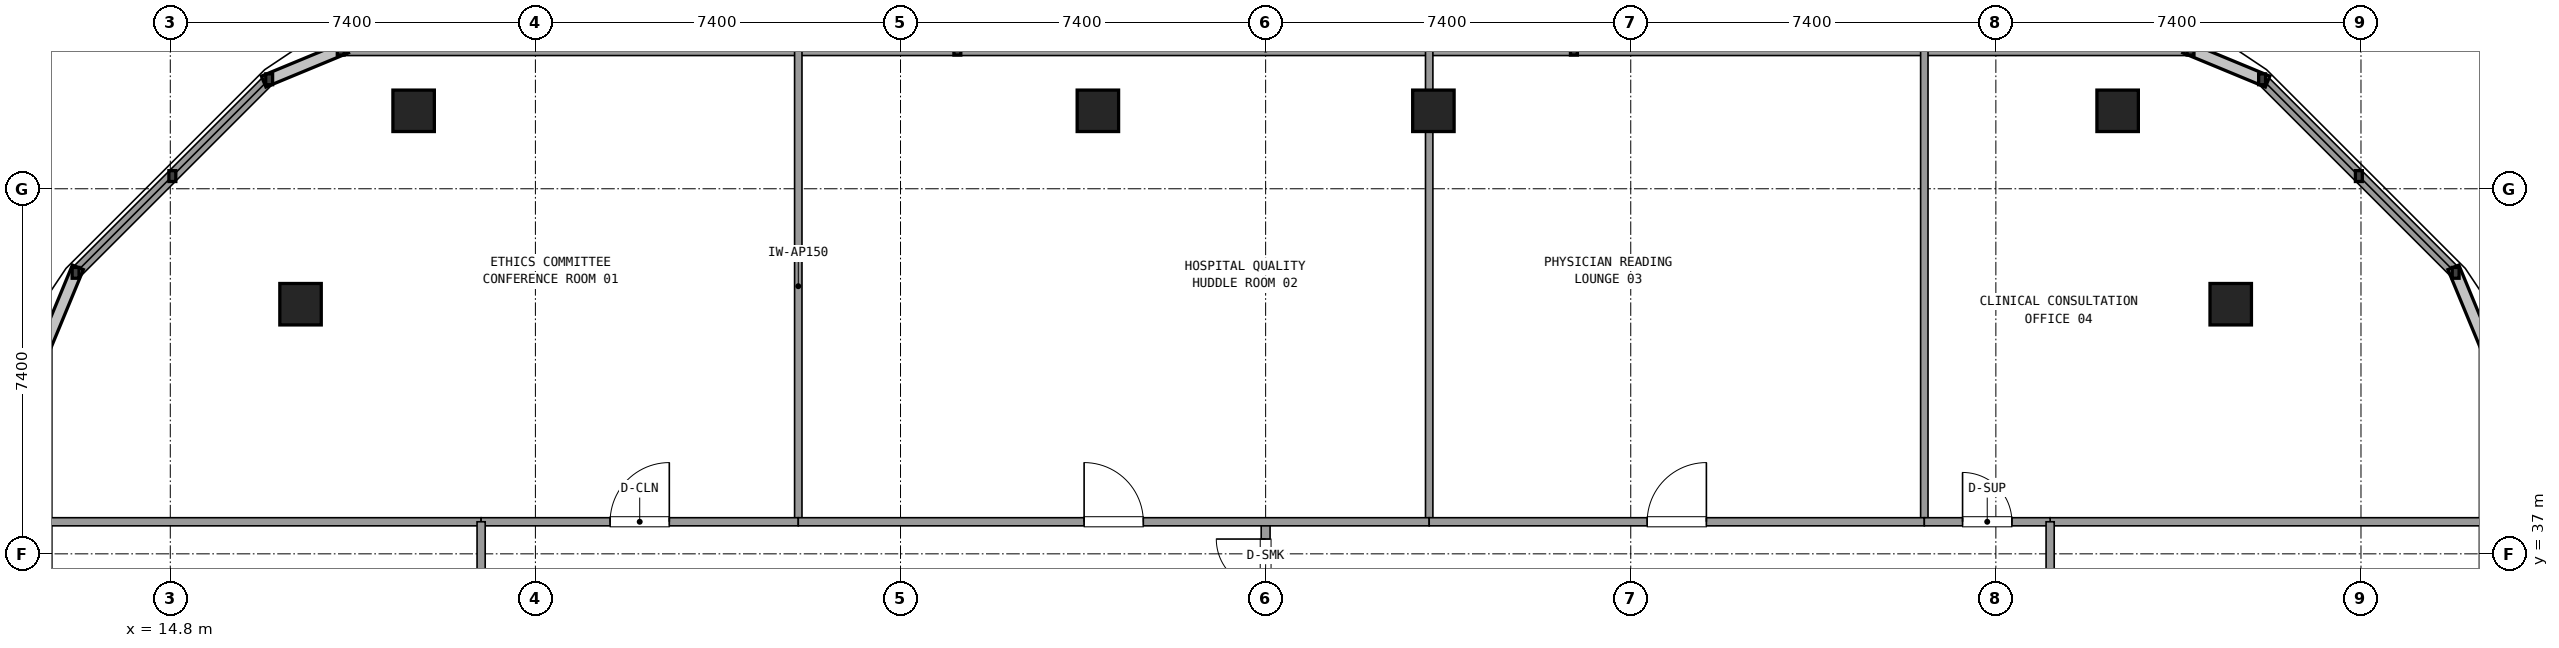
"""IFC4 building model, lengths in metres.
Left out: names, types, materials, properties, quantities, classifications, styles, units other than length and angle.
Written with IfcOpenShell. Run it as: python <this file> out.ifc"""

import sys

from ifc_helpers import new_model, si_unit, direction, frame, frame_2d, origin, origin_2d, place, context, subcontext, project, spatial, rectangle, extrude, element, fill, save


model = new_model("IFC4")
c1 = context("Model", 3, precision=1e-05, world=origin(), true_north=direction((0.0, 1.0)))
c2 = subcontext(c1, "Body", "Model", "MODEL_VIEW")
j1 = project(units=[si_unit("LENGTHUNIT", "METRE"), si_unit("PLANEANGLEUNIT", "RADIAN")], contexts=[c1])
p1 = place(None, origin())
s1 = spatial("IfcSite", under=j1, at=p1, CompositionType="ELEMENT")
p2 = place(p1, origin())
s2 = spatial("IfcBuilding", under=s1, at=p2, CompositionType="ELEMENT")
p3 = place(p2, frame((0.0, 0.0, 278.82)))
s3 = spatial("IfcBuildingStorey", under=s2, at=p3, CompositionType="ELEMENT", Elevation=278.82)
for number, where, z_axis, x_axis in (
    (1, (56.56, 42.06, 0.0), (0.0, 0.0, 1.0), (1.0, 0.0, 0.0)),
    (2, (54.268, 45.98, 0.0), (0.0, 0.0, 1.0), (1.0, 0.0, 0.0)),
    (3, (40.4, 45.98, 0.0), (0.0, 0.0, 1.0), (1.0, 0.0, 0.0)),
    (4, (33.6, 45.98, 0.0), (0.0, 0.0, 1.0), (1.0, 0.0, 0.0)),
    (5, (19.732, 45.98, 0.0), (0.0, 0.0, 1.0), (1.0, 0.0, 0.0)),
    (6, (17.44, 42.06, 0.0), (0.0, 0.0, 1.0), (1.0, 0.0, 0.0)),
):
    element("IfcColumn", number, at=place(p3, frame(where, z_axis=z_axis, x_axis=x_axis)), inside=s3, PredefinedType="COLUMN", context=c2, shape_type="SweptSolid", body=[
        extrude(rectangle(XDim=0.84, YDim=0.84, at=origin_2d()), origin(), (0.0, 0.0, 1.0), 3.6),
    ])
p4 = place(p3, frame((61.72, 10.555, 0.0), z_axis=(0.0, 0.0, 1.0), x_axis=(0.0, 1.0, 0.0)))
e7 = element("IfcWall", 7, at=p4, inside=s3, PredefinedType="SOLIDWALL", context=c2, shape_type="SweptSolid", body=[
    extrude(rectangle(XDim=30.69, YDim=0.24, at=frame_2d((15.345, 0.0))), origin(), (0.0, 0.0, 1.0), 0.85),
])
p5 = place(p3, frame((61.119, 42.696, 0.0), z_axis=(0.0, 0.0, 1.0), x_axis=(-0.707106781187, 0.707106781187, 0.0)))
e8 = element("IfcWall", 8, at=p5, inside=s3, PredefinedType="SOLIDWALL", context=c2, shape_type="SweptSolid", body=[
    extrude(rectangle(XDim=5.548, YDim=0.24, at=frame_2d((2.774, 0.0))), origin(), (0.0, 0.0, 1.0), 0.85),
])
p6 = place(p3, frame((55.745, 47.22, 0.0), z_axis=(0.0, 0.0, 1.0), x_axis=(-1.0, 0.0, 0.0)))
e9 = element("IfcWall", 9, at=p6, inside=s3, PredefinedType="SOLIDWALL", context=c2, shape_type="SweptSolid", body=[
    extrude(rectangle(XDim=37.49, YDim=0.24, at=frame_2d((18.745, 0.0))), origin(), (0.0, 0.0, 1.0), 0.85),
])
p7 = place(p3, frame((16.804, 46.619, 0.0), z_axis=(0.0, 0.0, 1.0), x_axis=(-0.707106781187, -0.707106781187, 0.0)))
e10 = element("IfcWall", 10, at=p7, inside=s3, PredefinedType="SOLIDWALL", context=c2, shape_type="SweptSolid", body=[
    extrude(rectangle(XDim=5.548, YDim=0.24, at=frame_2d((2.774, 0.0))), origin(), (0.0, 0.0, 1.0), 0.85),
])
p8 = place(p3, frame((12.28, 41.245, 0.0), z_axis=(0.0, 0.0, 1.0), x_axis=(0.0, -1.0, 0.0)))
e11 = element("IfcWall", 11, at=p8, inside=s3, PredefinedType="SOLIDWALL", context=c2, shape_type="SweptSolid", body=[
    extrude(rectangle(XDim=13.805, YDim=0.24, at=frame_2d((6.903, 0.0))), origin(), (0.0, 0.0, 1.0), 0.85),
])
p9 = place(p3, frame((37.0, 34.95, 0.0), z_axis=(0.0, 0.0, 1.0), x_axis=(0.0, 1.0, 0.0)))
e12 = element("IfcWall", 12, at=p9, inside=s3, PredefinedType="PARTITIONING", context=c2, shape_type="SweptSolid", body=[
    extrude(rectangle(XDim=2.7, YDim=0.18, at=frame_2d((1.35, 0.0))), origin(), (0.0, 0.0, 1.0), 2.61),
])
p10 = place(p9, frame((0.35, 0.0, 0.0)))
e13 = element("IfcOpeningElement", 13, at=p10, cuts=e12, PredefinedType="OPENING", context=c2, shape_type="SweptSolid", body=[
    extrude(rectangle(XDim=2.0, YDim=2.2, at=frame_2d((1.0, 1.1))), frame((0.0, 0.1, 0.0), z_axis=(0.0, -1.0, 0.0), x_axis=(1.0, 0.0, 0.0)), (0.0, 0.0, 1.0), 0.2),
])
for number, where, z_axis, x_axis in (
    (14, (12.3, 37.65, 0.0), (0.0, 0.0, 1.0), (1.0, 0.0, 0.0)),
    (15, (52.9, 37.65, 0.0), (0.0, 0.0, 1.0), (1.0, 0.0, 0.0)),
):
    element("IfcWall", number, at=place(p3, frame(where, z_axis=z_axis, x_axis=x_axis)), inside=s3, PredefinedType="PARTITIONING", context=c2, shape_type="SweptSolid", body=[
        extrude(rectangle(XDim=8.8, YDim=0.165, at=frame_2d((4.4, 0.0))), origin(), (0.0, 0.0, 1.0), 2.61),
    ])
p11 = place(p3, frame((27.528, 37.65, 0.0), z_axis=(0.0, 0.0, 1.0), x_axis=(0.0, 1.0, 0.0)))
e16 = element("IfcWall", 16, at=p11, inside=s3, PredefinedType="PARTITIONING", context=c2, shape_type="SweptSolid", body=[
    extrude(rectangle(XDim=9.55, YDim=0.15, at=frame_2d((4.775, 0.0))), origin(), (0.0, 0.0, 1.0), 2.61),
])
p12 = place(p3, frame((21.1, 37.65, 0.0), z_axis=(0.0, 0.0, 1.0), x_axis=(1.0, 0.0, 0.0)))
e17 = element("IfcWall", 17, at=p12, inside=s3, PredefinedType="PARTITIONING", context=c2, shape_type="SweptSolid", body=[
    extrude(rectangle(XDim=6.428, YDim=0.165, at=frame_2d((3.214, 0.0))), origin(), (0.0, 0.0, 1.0), 2.61),
])
p13 = place(p12, frame((2.614, 0.0, 0.0)))
e18 = element("IfcOpeningElement", 18, at=p13, cuts=e17, PredefinedType="OPENING", context=c2, shape_type="SweptSolid", body=[
    extrude(rectangle(XDim=1.2, YDim=2.15, at=frame_2d((0.6, 1.075))), frame((0.0, 0.093, 0.0), z_axis=(0.0, -1.0, 0.0), x_axis=(1.0, 0.0, 0.0)), (0.0, 0.0, 1.0), 0.185),
])
p14 = place(p3, frame((40.315, 37.65, 0.0), z_axis=(0.0, 0.0, 1.0), x_axis=(0.0, 1.0, 0.0)))
e19 = element("IfcWall", 19, at=p14, inside=s3, PredefinedType="PARTITIONING", context=c2, shape_type="SweptSolid", body=[
    extrude(rectangle(XDim=9.55, YDim=0.15, at=frame_2d((4.775, 0.0))), origin(), (0.0, 0.0, 1.0), 2.61),
])
p15 = place(p3, frame((27.528, 37.65, 0.0), z_axis=(0.0, 0.0, 1.0), x_axis=(1.0, 0.0, 0.0)))
e20 = element("IfcWall", 20, at=p15, inside=s3, PredefinedType="PARTITIONING", context=c2, shape_type="SweptSolid", body=[
    extrude(rectangle(XDim=12.787, YDim=0.165, at=frame_2d((6.394, 0.0))), origin(), (0.0, 0.0, 1.0), 2.61),
])
p16 = place(p15, frame((5.793, 0.0, 0.0)))
e21 = element("IfcOpeningElement", 21, at=p16, cuts=e20, PredefinedType="OPENING", context=c2, shape_type="SweptSolid", body=[
    extrude(rectangle(XDim=1.2, YDim=2.15, at=frame_2d((0.6, 1.075))), frame((0.0, 0.093, 0.0), z_axis=(0.0, -1.0, 0.0), x_axis=(1.0, 0.0, 0.0)), (0.0, 0.0, 1.0), 0.185),
])
p17 = place(p3, frame((50.35, 37.65, 0.0), z_axis=(0.0, 0.0, 1.0), x_axis=(0.0, 1.0, 0.0)))
e22 = element("IfcWall", 22, at=p17, inside=s3, PredefinedType="PARTITIONING", context=c2, shape_type="SweptSolid", body=[
    extrude(rectangle(XDim=9.55, YDim=0.15, at=frame_2d((4.775, 0.0))), origin(), (0.0, 0.0, 1.0), 2.61),
])
p18 = place(p3, frame((40.315, 37.65, 0.0), z_axis=(0.0, 0.0, 1.0), x_axis=(1.0, 0.0, 0.0)))
e23 = element("IfcWall", 23, at=p18, inside=s3, PredefinedType="PARTITIONING", context=c2, shape_type="SweptSolid", body=[
    extrude(rectangle(XDim=10.035, YDim=0.165, at=frame_2d((5.018, 0.0))), origin(), (0.0, 0.0, 1.0), 2.61),
])
p19 = place(p18, frame((4.418, 0.0, 0.0)))
e24 = element("IfcOpeningElement", 24, at=p19, cuts=e23, PredefinedType="OPENING", context=c2, shape_type="SweptSolid", body=[
    extrude(rectangle(XDim=1.2, YDim=2.15, at=frame_2d((0.6, 1.075))), frame((0.0, 0.093, 0.0), z_axis=(0.0, -1.0, 0.0), x_axis=(1.0, 0.0, 0.0)), (0.0, 0.0, 1.0), 0.185),
])
p20 = place(p3, frame((50.35, 37.65, 0.0), z_axis=(0.0, 0.0, 1.0), x_axis=(1.0, 0.0, 0.0)))
e25 = element("IfcWall", 25, at=p20, inside=s3, PredefinedType="PARTITIONING", context=c2, shape_type="SweptSolid", body=[
    extrude(rectangle(XDim=2.55, YDim=0.165, at=frame_2d((1.275, 0.0))), origin(), (0.0, 0.0, 1.0), 2.61),
])
p21 = place(p20, frame((0.775, 0.0, 0.0)))
e26 = element("IfcOpeningElement", 26, at=p21, cuts=e25, PredefinedType="OPENING", context=c2, shape_type="SweptSolid", body=[
    extrude(rectangle(XDim=1.0, YDim=2.15, at=frame_2d((0.5, 1.075))), frame((0.0, 0.093, 0.0), z_axis=(0.0, -1.0, 0.0), x_axis=(1.0, 0.0, 0.0)), (0.0, 0.0, 1.0), 0.185),
])
p22 = place(p3, frame((21.1, 24.1, 0.0), z_axis=(0.0, 0.0, 1.0), x_axis=(0.0, 1.0, 0.0)))
e27 = element("IfcWall", 27, at=p22, inside=s3, PredefinedType="PARTITIONING", context=c2, shape_type="SweptSolid", body=[
    extrude(rectangle(XDim=13.55, YDim=0.165, at=frame_2d((6.775, 0.0))), origin(), (0.0, 0.0, 1.0), 2.61),
])
p23 = place(p22, frame((6.175, 0.0, 0.0)))
e28 = element("IfcOpeningElement", 28, at=p23, cuts=e27, PredefinedType="OPENING", context=c2, shape_type="SweptSolid", body=[
    extrude(rectangle(XDim=1.2, YDim=2.15, at=frame_2d((0.6, 1.075))), frame((0.0, 0.093, 0.0), z_axis=(0.0, -1.0, 0.0), x_axis=(1.0, 0.0, 0.0)), (0.0, 0.0, 1.0), 0.185),
])
p24 = place(p3, frame((52.9, 30.6, 0.0), z_axis=(0.0, 0.0, 1.0), x_axis=(0.0, 1.0, 0.0)))
e29 = element("IfcWall", 29, at=p24, inside=s3, PredefinedType="PARTITIONING", context=c2, shape_type="SweptSolid", body=[
    extrude(rectangle(XDim=7.05, YDim=0.165, at=frame_2d((3.525, 0.0))), origin(), (0.0, 0.0, 1.0), 2.61),
])
p25 = place(p24, frame((2.925, 0.0, 0.0)))
e30 = element("IfcOpeningElement", 30, at=p25, cuts=e29, PredefinedType="OPENING", context=c2, shape_type="SweptSolid", body=[
    extrude(rectangle(XDim=1.2, YDim=2.15, at=frame_2d((0.6, 1.075))), frame((0.0, 0.093, 0.0), z_axis=(0.0, -1.0, 0.0), x_axis=(1.0, 0.0, 0.0)), (0.0, 0.0, 1.0), 0.185),
])
p26 = place(p10, origin())
e31 = element("IfcDoor", 31, at=p26, inside=s3, OperationType="DOUBLE_DOOR_SINGLE_SWING", PredefinedType="DOOR", context=c2, shape_type="SweptSolid", body=[
    extrude(rectangle(XDim=2.0, YDim=2.2, at=frame_2d((1.0, 1.1))), frame((0.0, 0.025, 0.0), z_axis=(0.0, -1.0, 0.0), x_axis=(1.0, 0.0, 0.0)), (0.0, 0.0, 1.0), 0.05),
])
fill(e13, e31)
p27 = place(p13, origin())
e32 = element("IfcDoor", 32, at=p27, inside=s3, OperationType="SINGLE_SWING_RIGHT", PredefinedType="DOOR", context=c2, shape_type="SweptSolid", body=[
    extrude(rectangle(XDim=1.2, YDim=2.15, at=frame_2d((0.6, 1.075))), frame((0.0, 0.025, 0.0), z_axis=(0.0, -1.0, 0.0), x_axis=(1.0, 0.0, 0.0)), (0.0, 0.0, 1.0), 0.05),
])
fill(e18, e32)
p28 = place(p16, origin())
e33 = element("IfcDoor", 33, at=p28, inside=s3, OperationType="SINGLE_SWING_LEFT", PredefinedType="DOOR", context=c2, shape_type="SweptSolid", body=[
    extrude(rectangle(XDim=1.2, YDim=2.15, at=frame_2d((0.6, 1.075))), frame((0.0, 0.025, 0.0), z_axis=(0.0, -1.0, 0.0), x_axis=(1.0, 0.0, 0.0)), (0.0, 0.0, 1.0), 0.05),
])
fill(e21, e33)
p29 = place(p19, origin())
e34 = element("IfcDoor", 34, at=p29, inside=s3, OperationType="SINGLE_SWING_RIGHT", PredefinedType="DOOR", context=c2, shape_type="SweptSolid", body=[
    extrude(rectangle(XDim=1.2, YDim=2.15, at=frame_2d((0.6, 1.075))), frame((0.0, 0.025, 0.0), z_axis=(0.0, -1.0, 0.0), x_axis=(1.0, 0.0, 0.0)), (0.0, 0.0, 1.0), 0.05),
])
fill(e24, e34)
p30 = place(p21, origin())
e35 = element("IfcDoor", 35, at=p30, inside=s3, OperationType="SINGLE_SWING_LEFT", PredefinedType="DOOR", context=c2, shape_type="SweptSolid", body=[
    extrude(rectangle(XDim=1.0, YDim=2.15, at=frame_2d((0.5, 1.075))), frame((0.0, 0.025, 0.0), z_axis=(0.0, -1.0, 0.0), x_axis=(1.0, 0.0, 0.0)), (0.0, 0.0, 1.0), 0.05),
])
fill(e26, e35)
save(model, sys.argv[1])
